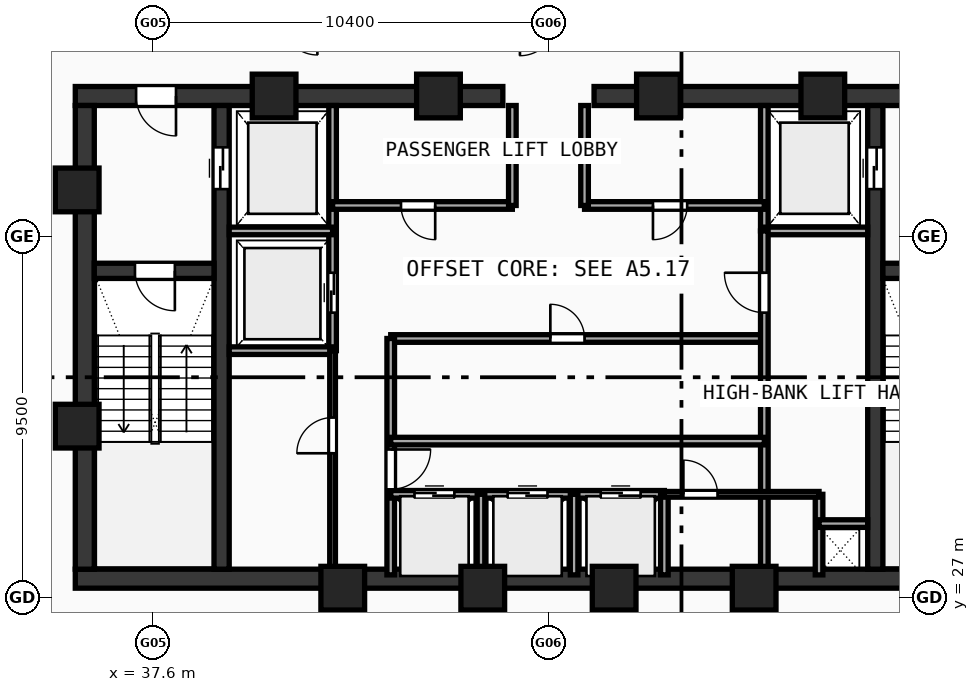
"""IFC4 building model, lengths in metres.
Left out: names, types, materials, properties, quantities, classifications, styles, units other than length and angle.
Written with IfcOpenShell. Run it as: python <this file> out.ifc"""

import sys

from ifc_helpers import new_model, si_unit, direction, frame, frame_2d, origin, origin_with_axes, origin_2d, place, context, subcontext, project, spatial, rectangle, hollow_rectangle, extrude, source, transform, mapped, element, fill, save


model = new_model("IFC4")
c1 = context("Model", 3, precision=1e-05, world=origin(), true_north=direction((0.0, 1.0)))
c2 = subcontext(c1, "Body", "Model", "MODEL_VIEW")
j1 = project(units=[si_unit("LENGTHUNIT", "METRE"), si_unit("PLANEANGLEUNIT", "RADIAN")], contexts=[c1])
p1 = place(None, origin())
s1 = spatial("IfcSite", under=j1, at=p1, CompositionType="ELEMENT")
p2 = place(p1, origin())
s2 = spatial("IfcBuilding", under=s1, at=p2, CompositionType="ELEMENT")
p3 = place(p2, frame((0.0, 0.0, 251.99)))
s3 = spatial("IfcBuildingStorey", under=s2, at=p3, CompositionType="ELEMENT", Elevation=251.99)
p4 = place(p3, frame((35.55, 27.5, 0.0), z_axis=(0.0, 0.0, 1.0), x_axis=(1.0, 0.0, 0.0)))
e1 = element("IfcWall", 1, at=p4, inside=s3, PredefinedType="SHEAR", context=c2, shape_type="SweptSolid", body=[
    extrude(rectangle(XDim=24.9, YDim=0.5, at=frame_2d((12.45, 0.0))), origin(), (0.0, 0.0, 1.0), 3.47),
])
p5 = place(p3, frame((35.55, 40.2, 0.0), z_axis=(0.0, 0.0, 1.0), x_axis=(1.0, 0.0, 0.0)))
e2 = element("IfcWall", 2, at=p5, inside=s3, PredefinedType="SHEAR", context=c2, shape_type="SweptSolid", body=[
    extrude(rectangle(XDim=11.25, YDim=0.5, at=frame_2d((5.625, 0.0))), origin(), (0.0, 0.0, 1.0), 3.47),
])
p6 = place(p5, frame((1.6, 0.0, 0.0)))
e3 = element("IfcOpeningElement", 3, at=p6, cuts=e2, PredefinedType="OPENING", context=c2, shape_type="SweptSolid", body=[
    extrude(rectangle(XDim=1.05, YDim=2.1, at=frame_2d((0.525, 1.05))), frame((0.0, 0.26, 0.0), z_axis=(0.0, -1.0, 0.0), x_axis=(1.0, 0.0, 0.0)), (0.0, 0.0, 1.0), 0.52),
])
p7 = place(p3, frame((49.2, 40.2, 0.0), z_axis=(0.0, 0.0, 1.0), x_axis=(1.0, 0.0, 0.0)))
e4 = element("IfcWall", 4, at=p7, inside=s3, PredefinedType="SHEAR", context=c2, shape_type="SweptSolid", body=[
    extrude(rectangle(XDim=11.25, YDim=0.5, at=frame_2d((5.625, 0.0))), origin(), (0.0, 0.0, 1.0), 3.47),
])
p8 = place(p7, frame((8.6, 0.0, 0.0)))
e5 = element("IfcOpeningElement", 5, at=p8, cuts=e4, PredefinedType="OPENING", context=c2, shape_type="SweptSolid", body=[
    extrude(rectangle(XDim=1.05, YDim=2.1, at=frame_2d((0.525, 1.05))), frame((0.0, 0.26, 0.0), z_axis=(0.0, -1.0, 0.0), x_axis=(1.0, 0.0, 0.0)), (0.0, 0.0, 1.0), 0.52),
])
p9 = place(p3, frame((35.8, 27.75, 0.0), z_axis=(0.0, 0.0, 1.0), x_axis=(0.0, 1.0, 0.0)))
e6 = element("IfcWall", 6, at=p9, inside=s3, PredefinedType="SHEAR", context=c2, shape_type="SweptSolid", body=[
    extrude(rectangle(XDim=12.2, YDim=0.5, at=frame_2d((6.1, 0.0))), origin(), (0.0, 0.0, 1.0), 3.47),
])
p10 = place(p3, frame((39.4, 27.75, 0.0), z_axis=(0.0, 0.0, 1.0), x_axis=(0.0, 1.0, 0.0)))
e7 = element("IfcWall", 7, at=p10, inside=s3, PredefinedType="SHEAR", context=c2, shape_type="SweptSolid", body=[
    extrude(rectangle(XDim=12.2, YDim=0.4, at=frame_2d((6.1, 0.0))), origin(), (0.0, 0.0, 1.0), 3.47),
])
p11 = place(p10, frame((10.0, 0.0, 0.0)))
e8 = element("IfcOpeningElement", 8, at=p11, cuts=e7, PredefinedType="OPENING", context=c2, shape_type="SweptSolid", body=[
    extrude(rectangle(XDim=1.1, YDim=2.1, at=frame_2d((0.55, 1.05))), frame((0.0, 0.21, 0.0), z_axis=(0.0, -1.0, 0.0), x_axis=(1.0, 0.0, 0.0)), (0.0, 0.0, 1.0), 0.42),
])
p12 = place(p3, frame((56.6, 27.75, 0.0), z_axis=(0.0, 0.0, 1.0), x_axis=(0.0, 1.0, 0.0)))
e9 = element("IfcWall", 9, at=p12, inside=s3, PredefinedType="SHEAR", context=c2, shape_type="SweptSolid", body=[
    extrude(rectangle(XDim=12.2, YDim=0.4, at=frame_2d((6.1, 0.0))), origin(), (0.0, 0.0, 1.0), 3.47),
])
p13 = place(p12, frame((10.0, 0.0, 0.0)))
e10 = element("IfcOpeningElement", 10, at=p13, cuts=e9, PredefinedType="OPENING", context=c2, shape_type="SweptSolid", body=[
    extrude(rectangle(XDim=1.1, YDim=2.1, at=frame_2d((0.55, 1.05))), frame((0.0, 0.21, 0.0), z_axis=(0.0, -1.0, 0.0), x_axis=(1.0, 0.0, 0.0)), (0.0, 0.0, 1.0), 0.42),
])
p14 = place(p3, frame((36.05, 35.6, 0.0), z_axis=(0.0, 0.0, 1.0), x_axis=(1.0, 0.0, 0.0)))
e11 = element("IfcWall", 11, at=p14, inside=s3, PredefinedType="SHEAR", context=c2, shape_type="SweptSolid", body=[
    extrude(rectangle(XDim=3.15, YDim=0.4, at=frame_2d((1.575, 0.0))), origin(), (0.0, 0.0, 1.0), 3.47),
])
p15 = place(p14, frame((1.07, 0.0, 0.0)))
e12 = element("IfcOpeningElement", 12, at=p15, cuts=e11, PredefinedType="OPENING", context=c2, shape_type="SweptSolid", body=[
    extrude(rectangle(XDim=1.05, YDim=2.1, at=frame_2d((0.525, 1.05))), frame((0.0, 0.21, 0.0), z_axis=(0.0, -1.0, 0.0), x_axis=(1.0, 0.0, 0.0)), (0.0, 0.0, 1.0), 0.42),
])
p16 = place(p3, frame((56.8, 35.6, 0.0), z_axis=(0.0, 0.0, 1.0), x_axis=(1.0, 0.0, 0.0)))
e13 = element("IfcWall", 13, at=p16, inside=s3, PredefinedType="SHEAR", context=c2, shape_type="SweptSolid", body=[
    extrude(rectangle(XDim=3.15, YDim=0.4, at=frame_2d((1.575, 0.0))), origin(), (0.0, 0.0, 1.0), 3.47),
])
p17 = place(p16, frame((1.02, 0.0, 0.0)))
e14 = element("IfcOpeningElement", 14, at=p17, cuts=e13, PredefinedType="OPENING", context=c2, shape_type="SweptSolid", body=[
    extrude(rectangle(XDim=1.05, YDim=2.1, at=frame_2d((0.525, 1.05))), frame((0.0, 0.21, 0.0), z_axis=(0.0, -1.0, 0.0), x_axis=(1.0, 0.0, 0.0)), (0.0, 0.0, 1.0), 0.42),
])
m1 = source(origin(), c2, "Body", "SweptSolid", [
    extrude(hollow_rectangle(XDim=1.15, YDim=1.15, WallThickness=0.048, at=origin_2d()), origin(), (0.0, 0.0, 1.0), 3.73),
])
for number, where, z_axis, x_axis in (
    (15, (42.588, 27.25, -0.26), (0.0, 0.0, 1.0), (1.0, 0.0, 0.0)),
    (16, (46.272, 27.25, -0.26), (0.0, 0.0, 1.0), (1.0, 0.0, 0.0)),
    (17, (49.729, 27.25, -0.26), (0.0, 0.0, 1.0), (1.0, 0.0, 0.0)),
    (18, (53.412, 27.25, -0.26), (0.0, 0.0, 1.0), (1.0, 0.0, 0.0)),
    (19, (55.219, 40.2, -0.26), (0.0, 0.0, 1.0), (1.0, 0.0, 0.0)),
    (20, (50.894, 40.2, -0.26), (0.0, 0.0, 1.0), (1.0, 0.0, 0.0)),
    (21, (45.106, 40.2, -0.26), (0.0, 0.0, 1.0), (1.0, 0.0, 0.0)),
    (22, (40.781, 40.2, -0.26), (0.0, 0.0, 1.0), (1.0, 0.0, 0.0)),
    (23, (35.6, 37.729, -0.26), (0.0, 0.0, 1.0), (1.0, 0.0, 0.0)),
    (24, (35.6, 31.513, -0.26), (0.0, 0.0, 1.0), (1.0, 0.0, 0.0)),
):
    element("IfcColumn", number, at=place(p3, frame(where, z_axis=z_axis, x_axis=x_axis)), inside=s3, PredefinedType="COLUMN", context=c2, shape_type="MappedRepresentation", body=[
        mapped(m1, transform((0.0, 0.0, 0.0), scale=1.0)),
    ])
p18 = place(p3, frame((42.32, 33.5, 0.0), z_axis=(0.0, 0.0, 1.0), x_axis=(0.0, 1.0, 0.0)))
e25 = element("IfcWall", 25, at=p18, inside=s3, PredefinedType="SOLIDWALL", context=c2, shape_type="SweptSolid", body=[
    extrude(rectangle(XDim=6.45, YDim=0.2, at=frame_2d((3.225, 0.0))), origin(), (0.0, 0.0, 1.0), 3.47),
])
p19 = place(p18, frame((1.0, 0.0, 0.0)))
e26 = element("IfcOpeningElement", 26, at=p19, cuts=e25, PredefinedType="OPENING", context=c2, shape_type="SweptSolid", body=[
    extrude(rectangle(XDim=1.05, YDim=2.1, at=frame_2d((0.525, 1.05))), frame((0.0, 0.11, 0.0), z_axis=(0.0, -1.0, 0.0), x_axis=(1.0, 0.0, 0.0)), (0.0, 0.0, 1.0), 0.22),
])
for number, where, z_axis, x_axis in (
    (27, (39.6, 36.65, 0.0), (0.0, 0.0, 1.0), (1.0, 0.0, 0.0)),
    (28, (39.6, 33.5, 0.0), (0.0, 0.0, 1.0), (1.0, 0.0, 0.0)),
):
    element("IfcWall", number, at=place(p3, frame(where, z_axis=z_axis, x_axis=x_axis)), inside=s3, PredefinedType="SOLIDWALL", context=c2, shape_type="SweptSolid", body=[
        extrude(rectangle(XDim=2.72, YDim=0.2, at=frame_2d((1.36, 0.0))), origin(), (0.0, 0.0, 1.0), 3.47),
    ])
p20 = place(p3, frame((53.68, 36.65, 0.0), z_axis=(0.0, 0.0, 1.0), x_axis=(0.0, 1.0, 0.0)))
e29 = element("IfcWall", 29, at=p20, inside=s3, PredefinedType="SOLIDWALL", context=c2, shape_type="SweptSolid", body=[
    extrude(rectangle(XDim=3.3, YDim=0.2, at=frame_2d((1.65, 0.0))), origin(), (0.0, 0.0, 1.0), 3.47),
])
p21 = place(p3, frame((53.68, 36.65, 0.0), z_axis=(0.0, 0.0, 1.0), x_axis=(1.0, 0.0, 0.0)))
e30 = element("IfcWall", 30, at=p21, inside=s3, PredefinedType="SOLIDWALL", context=c2, shape_type="SweptSolid", body=[
    extrude(rectangle(XDim=2.72, YDim=0.2, at=frame_2d((1.36, 0.0))), origin(), (0.0, 0.0, 1.0), 3.47),
])
p22 = place(p3, frame((42.32, 37.32, 0.0), z_axis=(0.0, 0.0, 1.0), x_axis=(1.0, 0.0, 0.0)))
e31 = element("IfcWall", 31, at=p22, inside=s3, PredefinedType="SOLIDWALL", context=c2, shape_type="SweptSolid", body=[
    extrude(rectangle(XDim=4.73, YDim=0.2, at=frame_2d((2.365, 0.0))), origin(), (0.0, 0.0, 1.0), 3.47),
])
p23 = place(p22, frame((1.8, 0.0, 0.0)))
e32 = element("IfcOpeningElement", 32, at=p23, cuts=e31, PredefinedType="OPENING", context=c2, shape_type="SweptSolid", body=[
    extrude(rectangle(XDim=0.9, YDim=2.1, at=frame_2d((0.45, 1.05))), frame((0.0, 0.11, 0.0), z_axis=(0.0, -1.0, 0.0), x_axis=(1.0, 0.0, 0.0)), (0.0, 0.0, 1.0), 0.22),
])
p24 = place(p3, frame((48.95, 37.32, 0.0), z_axis=(0.0, 0.0, 1.0), x_axis=(1.0, 0.0, 0.0)))
e33 = element("IfcWall", 33, at=p24, inside=s3, PredefinedType="SOLIDWALL", context=c2, shape_type="SweptSolid", body=[
    extrude(rectangle(XDim=4.73, YDim=0.2, at=frame_2d((2.365, 0.0))), origin(), (0.0, 0.0, 1.0), 3.47),
])
p25 = place(p24, frame((1.8, 0.0, 0.0)))
e34 = element("IfcOpeningElement", 34, at=p25, cuts=e33, PredefinedType="OPENING", context=c2, shape_type="SweptSolid", body=[
    extrude(rectangle(XDim=0.9, YDim=2.1, at=frame_2d((0.45, 1.05))), frame((0.0, 0.11, 0.0), z_axis=(0.0, -1.0, 0.0), x_axis=(1.0, 0.0, 0.0)), (0.0, 0.0, 1.0), 0.22),
])
for number, where, z_axis, x_axis in (
    (35, (47.05, 37.32, 0.0), (0.0, 0.0, 1.0), (0.0, 1.0, 0.0)),
    (36, (48.95, 37.32, 0.0), (0.0, 0.0, 1.0), (0.0, 1.0, 0.0)),
):
    element("IfcWall", number, at=place(p3, frame(where, z_axis=z_axis, x_axis=x_axis)), inside=s3, PredefinedType="SOLIDWALL", context=c2, shape_type="SweptSolid", body=[
        extrude(rectangle(XDim=2.63, YDim=0.2, at=frame_2d((1.315, 0.0))), origin(), (0.0, 0.0, 1.0), 3.47),
    ])
p26 = place(p3, frame((43.85, 33.82, 0.0), z_axis=(0.0, 0.0, 1.0), x_axis=(1.0, 0.0, 0.0)))
e37 = element("IfcWall", 37, at=p26, inside=s3, PredefinedType="SOLIDWALL", context=c2, shape_type="SweptSolid", body=[
    extrude(rectangle(XDim=9.83, YDim=0.2, at=frame_2d((4.915, 0.0))), origin(), (0.0, 0.0, 1.0), 3.47),
])
p27 = place(p26, frame((4.2, 0.0, 0.0)))
e38 = element("IfcOpeningElement", 38, at=p27, cuts=e37, PredefinedType="OPENING", context=c2, shape_type="SweptSolid", body=[
    extrude(rectangle(XDim=0.9, YDim=2.1, at=frame_2d((0.45, 1.05))), frame((0.0, 0.11, 0.0), z_axis=(0.0, -1.0, 0.0), x_axis=(1.0, 0.0, 0.0)), (0.0, 0.0, 1.0), 0.22),
])
p28 = place(p3, frame((43.85, 27.6, 0.0), z_axis=(0.0, 0.0, 1.0), x_axis=(0.0, 1.0, 0.0)))
e39 = element("IfcWall", 39, at=p28, inside=s3, PredefinedType="SOLIDWALL", context=c2, shape_type="SweptSolid", body=[
    extrude(rectangle(XDim=6.22, YDim=0.2, at=frame_2d((3.11, 0.0))), origin(), (0.0, 0.0, 1.0), 3.47),
])
p29 = place(p28, frame((2.25, 0.0, 0.0)))
e40 = element("IfcOpeningElement", 40, at=p29, cuts=e39, PredefinedType="OPENING", context=c2, shape_type="SweptSolid", body=[
    extrude(rectangle(XDim=1.05, YDim=2.1, at=frame_2d((0.525, 1.05))), frame((0.0, 0.11, 0.0), z_axis=(0.0, -1.0, 0.0), x_axis=(1.0, 0.0, 0.0)), (0.0, 0.0, 1.0), 0.22),
])
p30 = place(p3, frame((53.68, 27.6, 0.0), z_axis=(0.0, 0.0, 1.0), x_axis=(0.0, 1.0, 0.0)))
e41 = element("IfcWall", 41, at=p30, inside=s3, PredefinedType="SOLIDWALL", context=c2, shape_type="SweptSolid", body=[
    extrude(rectangle(XDim=9.05, YDim=0.2, at=frame_2d((4.525, 0.0))), origin(), (0.0, 0.0, 1.0), 3.47),
])
p31 = place(p30, frame((6.9, 0.0, 0.0)))
e42 = element("IfcOpeningElement", 42, at=p31, cuts=e41, PredefinedType="OPENING", context=c2, shape_type="SweptSolid", body=[
    extrude(rectangle(XDim=1.05, YDim=2.1, at=frame_2d((0.525, 1.05))), frame((0.0, 0.11, 0.0), z_axis=(0.0, -1.0, 0.0), x_axis=(1.0, 0.0, 0.0)), (0.0, 0.0, 1.0), 0.22),
])
p32 = place(p3, frame((43.85, 29.72, 0.0), z_axis=(0.0, 0.0, 1.0), x_axis=(1.0, 0.0, 0.0)))
e43 = element("IfcWall", 43, at=p32, inside=s3, PredefinedType="SOLIDWALL", context=c2, shape_type="SweptSolid", body=[
    extrude(rectangle(XDim=7.2, YDim=0.2, at=frame_2d((3.6, 0.0))), origin(), (0.0, 0.0, 1.0), 3.47),
])
p33 = place(p32, frame((0.625, 0.0, 0.0)))
e44 = element("IfcOpeningElement", 44, at=p33, cuts=e43, PredefinedType="OPENING", context=c2, shape_type="SweptSolid", body=[
    extrude(rectangle(XDim=1.05, YDim=2.1, at=frame_2d((0.525, 1.05))), frame((0.0, 0.11, 0.0), z_axis=(0.0, -1.0, 0.0), x_axis=(1.0, 0.0, 0.0)), (0.0, 0.0, 1.0), 0.22),
])
p34 = place(p32, frame((3.075, 0.0, 0.0)))
e45 = element("IfcOpeningElement", 45, at=p34, cuts=e43, PredefinedType="OPENING", context=c2, shape_type="SweptSolid", body=[
    extrude(rectangle(XDim=1.05, YDim=2.1, at=frame_2d((0.525, 1.05))), frame((0.0, 0.11, 0.0), z_axis=(0.0, -1.0, 0.0), x_axis=(1.0, 0.0, 0.0)), (0.0, 0.0, 1.0), 0.22),
])
p35 = place(p32, frame((5.525, 0.0, 0.0)))
e46 = element("IfcOpeningElement", 46, at=p35, cuts=e43, PredefinedType="OPENING", context=c2, shape_type="SweptSolid", body=[
    extrude(rectangle(XDim=1.05, YDim=2.1, at=frame_2d((0.525, 1.05))), frame((0.0, 0.11, 0.0), z_axis=(0.0, -1.0, 0.0), x_axis=(1.0, 0.0, 0.0)), (0.0, 0.0, 1.0), 0.22),
])
p36 = place(p3, frame((51.05, 27.6, 0.0), z_axis=(0.0, 0.0, 1.0), x_axis=(0.0, 1.0, 0.0)))
e47 = element("IfcWall", 47, at=p36, inside=s3, PredefinedType="SOLIDWALL", context=c2, shape_type="SweptSolid", body=[
    extrude(rectangle(XDim=2.12, YDim=0.2, at=frame_2d((1.06, 0.0))), origin(), (0.0, 0.0, 1.0), 3.47),
])
p37 = place(p3, frame((43.85, 31.12, 0.0), z_axis=(0.0, 0.0, 1.0), x_axis=(1.0, 0.0, 0.0)))
e48 = element("IfcWall", 48, at=p37, inside=s3, PredefinedType="SOLIDWALL", context=c2, shape_type="SweptSolid", body=[
    extrude(rectangle(XDim=9.83, YDim=0.2, at=frame_2d((4.915, 0.0))), origin(), (0.0, 0.0, 1.0), 3.47),
])
for number, where, z_axis, x_axis in (
    (49, (46.225, 27.6, 0.0), (0.0, 0.0, 1.0), (0.0, 1.0, 0.0)),
    (50, (48.675, 27.6, 0.0), (0.0, 0.0, 1.0), (0.0, 1.0, 0.0)),
    (51, (55.12, 27.6, 0.0), (0.0, 0.0, 1.0), (0.0, 1.0, 0.0)),
):
    element("IfcWall", number, at=place(p3, frame(where, z_axis=z_axis, x_axis=x_axis)), inside=s3, PredefinedType="SOLIDWALL", context=c2, shape_type="SweptSolid", body=[
        extrude(rectangle(XDim=2.12, YDim=0.2, at=frame_2d((1.06, 0.0))), origin(), (0.0, 0.0, 1.0), 3.47),
    ])
p38 = place(p3, frame((55.12, 28.95, 0.0), z_axis=(0.0, 0.0, 1.0), x_axis=(1.0, 0.0, 0.0)))
e52 = element("IfcWall", 52, at=p38, inside=s3, PredefinedType="SOLIDWALL", context=c2, shape_type="SweptSolid", body=[
    extrude(rectangle(XDim=1.28, YDim=0.2, at=frame_2d((0.64, 0.0))), origin(), (0.0, 0.0, 1.0), 3.47),
])
p39 = place(p3, frame((42.32, 27.6, 0.0), z_axis=(0.0, 0.0, 1.0), x_axis=(0.0, 1.0, 0.0)))
e53 = element("IfcWall", 53, at=p39, inside=s3, PredefinedType="PARTITIONING", context=c2, shape_type="SweptSolid", body=[
    extrude(rectangle(XDim=5.9, YDim=0.15, at=frame_2d((2.95, 0.0))), origin(), (0.0, 0.0, 1.0), 3.47),
])
p40 = place(p39, frame((3.2, 0.0, 0.0)))
e54 = element("IfcOpeningElement", 54, at=p40, cuts=e53, PredefinedType="OPENING", context=c2, shape_type="SweptSolid", body=[
    extrude(rectangle(XDim=0.94, YDim=2.1, at=frame_2d((0.47, 1.05))), frame((0.0, 0.085, 0.0), z_axis=(0.0, -1.0, 0.0), x_axis=(1.0, 0.0, 0.0)), (0.0, 0.0, 1.0), 0.17),
])
p41 = place(p3, frame((51.05, 29.72, 0.0), z_axis=(0.0, 0.0, 1.0), x_axis=(1.0, 0.0, 0.0)))
e55 = element("IfcWall", 55, at=p41, inside=s3, PredefinedType="PARTITIONING", context=c2, shape_type="SweptSolid", body=[
    extrude(rectangle(XDim=4.07, YDim=0.15, at=frame_2d((2.035, 0.0))), origin(), (0.0, 0.0, 1.0), 3.47),
])
p42 = place(p41, frame((0.5, 0.0, 0.0)))
e56 = element("IfcOpeningElement", 56, at=p42, cuts=e55, PredefinedType="OPENING", context=c2, shape_type="SweptSolid", body=[
    extrude(rectangle(XDim=0.9, YDim=2.1, at=frame_2d((0.45, 1.05))), frame((0.0, 0.085, 0.0), z_axis=(0.0, -1.0, 0.0), x_axis=(1.0, 0.0, 0.0)), (0.0, 0.0, 1.0), 0.17),
])
m2 = source(origin(), c2, "Body", "SweptSolid", [
    extrude(rectangle(XDim=1.05, YDim=2.1, at=frame_2d((0.525, 1.05))), frame((0.0, 0.025, 0.0), z_axis=(0.0, -1.0, 0.0), x_axis=(1.0, 0.0, 0.0)), (0.0, 0.0, 1.0), 0.05),
])
p43 = place(p15, frame((1.05, 0.0, 0.0), z_axis=(0.0, 0.0, 1.0), x_axis=(-1.0, 0.0, 0.0)))
e57 = element("IfcDoor", 57, at=p43, inside=s3, OperationType="SINGLE_SWING_LEFT", PredefinedType="DOOR", context=c2, shape_type="MappedRepresentation", body=[
    mapped(m2, transform((0.0, 0.0, 0.0), scale=1.0)),
])
fill(e12, e57)
p44 = place(p6, frame((1.05, 0.0, 0.0), z_axis=(0.0, 0.0, 1.0), x_axis=(-1.0, 0.0, 0.0)))
e58 = element("IfcDoor", 58, at=p44, inside=s3, OperationType="SINGLE_SWING_LEFT", PredefinedType="DOOR", context=c2, shape_type="MappedRepresentation", body=[
    mapped(m2, transform((0.0, 0.0, 0.0), scale=1.0)),
])
fill(e3, e58)
m3 = source(origin(), c2, "Body", "SweptSolid", [
    extrude(rectangle(XDim=1.1, YDim=2.1, at=frame_2d((0.55, 1.05))), frame((0.0, 0.025, 0.0), z_axis=(0.0, -1.0, 0.0), x_axis=(1.0, 0.0, 0.0)), (0.0, 0.0, 1.0), 0.05),
])
p45 = place(p11, frame((1.1, 0.0, 0.0), z_axis=(0.0, 0.0, 1.0), x_axis=(-1.0, 0.0, 0.0)))
e59 = element("IfcDoor", 59, at=p45, inside=s3, OperationType="DOUBLE_DOOR_SLIDING", PredefinedType="DOOR", context=c2, shape_type="MappedRepresentation", body=[
    mapped(m3, transform((0.0, 0.0, 0.0), scale=1.0)),
])
fill(e8, e59)
p46 = place(p13, origin_with_axes())
e60 = element("IfcDoor", 60, at=p46, inside=s3, OperationType="DOUBLE_DOOR_SLIDING", PredefinedType="DOOR", context=c2, shape_type="MappedRepresentation", body=[
    mapped(m3, transform((0.0, 0.0, 0.0), scale=1.0)),
])
fill(e10, e60)
p47 = place(p19, origin_with_axes())
e61 = element("IfcDoor", 61, at=p47, inside=s3, OperationType="DOUBLE_DOOR_SLIDING", PredefinedType="DOOR", context=c2, shape_type="MappedRepresentation", body=[
    mapped(m2, transform((0.0, 0.0, 0.0), scale=1.0)),
])
fill(e26, e61)
m4 = source(origin(), c2, "Body", "SweptSolid", [
    extrude(rectangle(XDim=0.9, YDim=2.1, at=frame_2d((0.45, 1.05))), frame((0.0, 0.025, 0.0), z_axis=(0.0, -1.0, 0.0), x_axis=(1.0, 0.0, 0.0)), (0.0, 0.0, 1.0), 0.05),
])
p48 = place(p23, frame((0.9, 0.0, 0.0), z_axis=(0.0, 0.0, 1.0), x_axis=(-1.0, 0.0, 0.0)))
e62 = element("IfcDoor", 62, at=p48, inside=s3, OperationType="SINGLE_SWING_LEFT", PredefinedType="DOOR", context=c2, shape_type="MappedRepresentation", body=[
    mapped(m4, transform((0.0, 0.0, 0.0), scale=1.0)),
])
fill(e32, e62)
p49 = place(p25, frame((0.9, 0.0, 0.0), z_axis=(0.0, 0.0, 1.0), x_axis=(-1.0, 0.0, 0.0)))
e63 = element("IfcDoor", 63, at=p49, inside=s3, OperationType="SINGLE_SWING_RIGHT", PredefinedType="DOOR", context=c2, shape_type="MappedRepresentation", body=[
    mapped(m4, transform((0.0, 0.0, 0.0), scale=1.0)),
])
fill(e34, e63)
p50 = place(p27, origin_with_axes())
e64 = element("IfcDoor", 64, at=p50, inside=s3, OperationType="SINGLE_SWING_LEFT", PredefinedType="DOOR", context=c2, shape_type="MappedRepresentation", body=[
    mapped(m4, transform((0.0, 0.0, 0.0), scale=1.0)),
])
fill(e38, e64)
p51 = place(p29, frame((1.05, 0.0, 0.0), z_axis=(0.0, 0.0, 1.0), x_axis=(-1.0, 0.0, 0.0)))
e65 = element("IfcDoor", 65, at=p51, inside=s3, OperationType="SINGLE_SWING_LEFT", PredefinedType="DOOR", context=c2, shape_type="MappedRepresentation", body=[
    mapped(m2, transform((0.0, 0.0, 0.0), scale=1.0)),
])
fill(e40, e65)
p52 = place(p31, origin_with_axes())
e66 = element("IfcDoor", 66, at=p52, inside=s3, OperationType="SINGLE_SWING_RIGHT", PredefinedType="DOOR", context=c2, shape_type="MappedRepresentation", body=[
    mapped(m2, transform((0.0, 0.0, 0.0), scale=1.0)),
])
fill(e42, e66)
p53 = place(p33, origin_with_axes())
e67 = element("IfcDoor", 67, at=p53, inside=s3, OperationType="DOUBLE_DOOR_SLIDING", PredefinedType="DOOR", context=c2, shape_type="MappedRepresentation", body=[
    mapped(m2, transform((0.0, 0.0, 0.0), scale=1.0)),
])
fill(e44, e67)
p54 = place(p34, origin_with_axes())
e68 = element("IfcDoor", 68, at=p54, inside=s3, OperationType="DOUBLE_DOOR_SLIDING", PredefinedType="DOOR", context=c2, shape_type="MappedRepresentation", body=[
    mapped(m2, transform((0.0, 0.0, 0.0), scale=1.0)),
])
fill(e45, e68)
p55 = place(p35, origin_with_axes())
e69 = element("IfcDoor", 69, at=p55, inside=s3, OperationType="DOUBLE_DOOR_SLIDING", PredefinedType="DOOR", context=c2, shape_type="MappedRepresentation", body=[
    mapped(m2, transform((0.0, 0.0, 0.0), scale=1.0)),
])
fill(e46, e69)
m5 = source(origin(), c2, "Body", "SweptSolid", [
    extrude(rectangle(XDim=0.94, YDim=2.1, at=frame_2d((0.47, 1.05))), frame((0.0, 0.025, 0.0), z_axis=(0.0, -1.0, 0.0), x_axis=(1.0, 0.0, 0.0)), (0.0, 0.0, 1.0), 0.05),
])
p56 = place(p40, origin_with_axes())
e70 = element("IfcDoor", 70, at=p56, inside=s3, OperationType="SINGLE_SWING_LEFT", PredefinedType="DOOR", context=c2, shape_type="MappedRepresentation", body=[
    mapped(m5, transform((0.0, 0.0, 0.0), scale=1.0)),
])
fill(e54, e70)
p57 = place(p42, origin_with_axes())
e71 = element("IfcDoor", 71, at=p57, inside=s3, OperationType="SINGLE_SWING_LEFT", PredefinedType="DOOR", context=c2, shape_type="MappedRepresentation", body=[
    mapped(m4, transform((0.0, 0.0, 0.0), scale=1.0)),
])
fill(e56, e71)
save(model, sys.argv[1])
